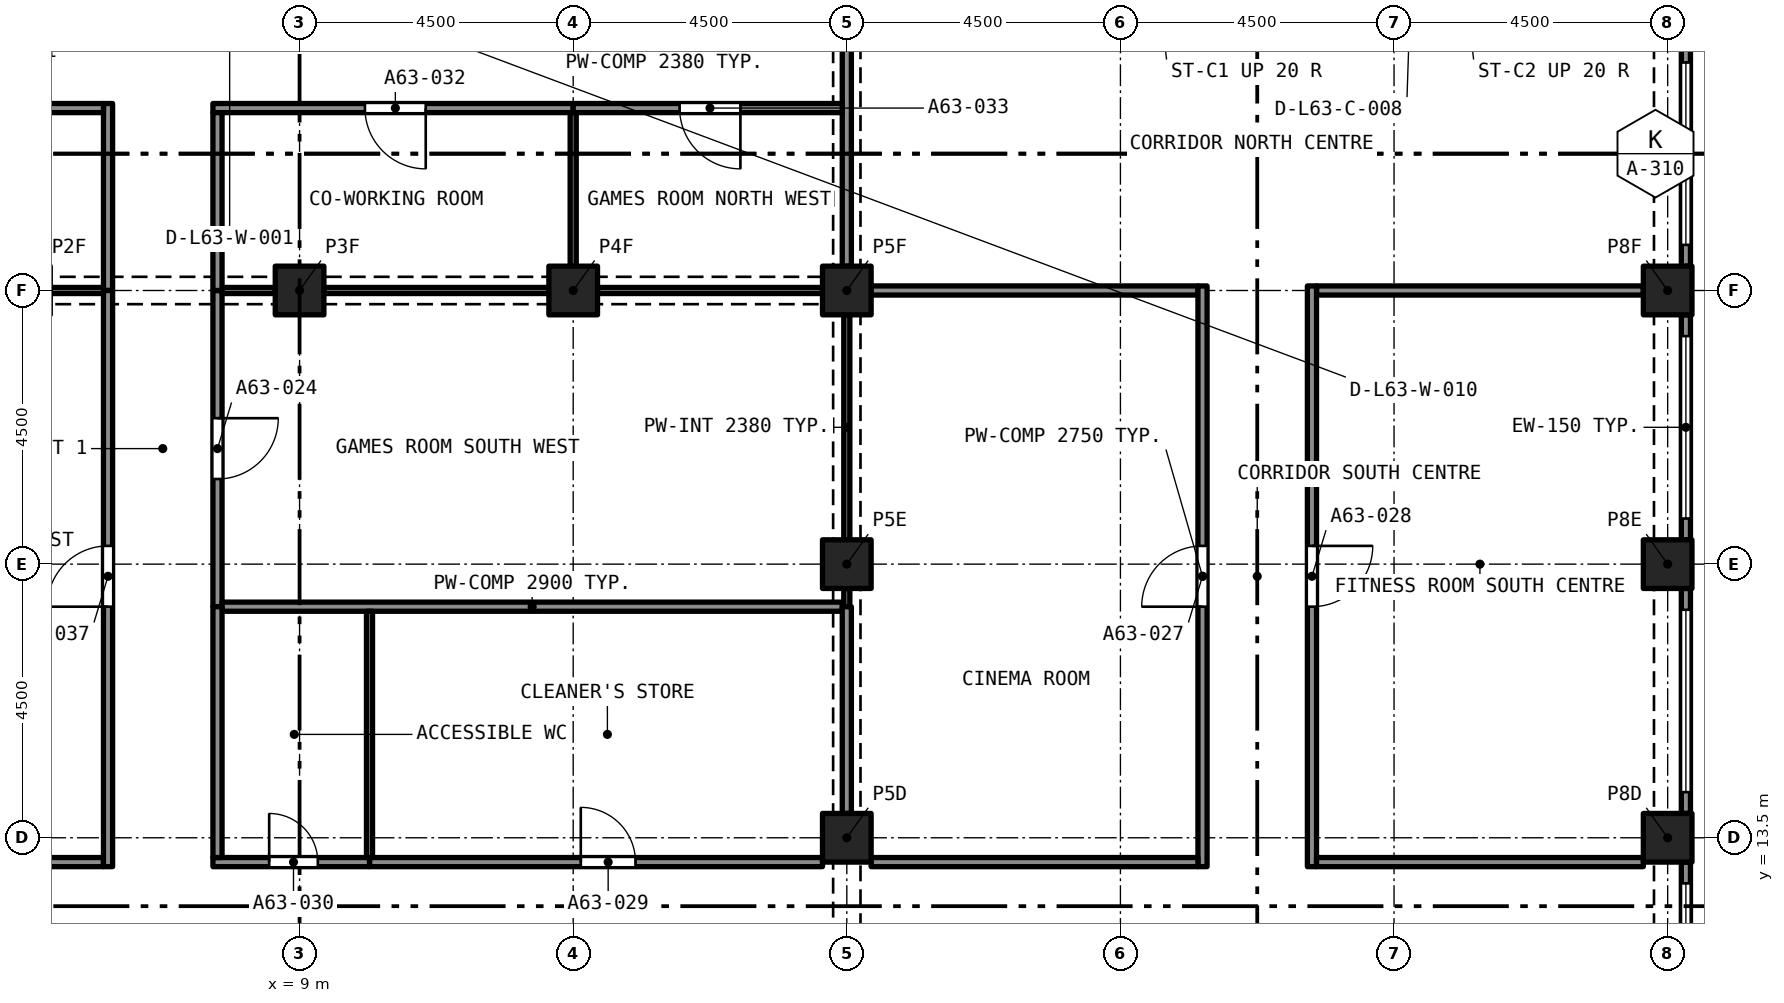
"""IFC4 building model, lengths in metres.
Left out: names, types, materials, properties, quantities, classifications, styles, units other than length and angle.
Written with IfcOpenShell. Run it as: python <this file> out.ifc"""

import sys

from ifc_helpers import new_model, si_unit, direction, frame, frame_2d, origin, origin_2d, place, context, subcontext, project, spatial, rectangle, extrude, element, fill, save


model = new_model("IFC4")
c1 = context("Model", 3, precision=1e-05, world=origin(), true_north=direction((0.0, 1.0)))
c2 = subcontext(c1, "Body", "Model", "MODEL_VIEW")
j1 = project(units=[si_unit("LENGTHUNIT", "METRE"), si_unit("PLANEANGLEUNIT", "RADIAN")], contexts=[c1])
p1 = place(None, origin())
s1 = spatial("IfcSite", under=j1, at=p1, CompositionType="ELEMENT")
p2 = place(p1, origin())
s2 = spatial("IfcBuilding", under=s1, at=p2, CompositionType="ELEMENT")
p3 = place(p2, frame((0.0, 0.0, 226.095)))
s3 = spatial("IfcBuildingStorey", under=s2, at=p3, CompositionType="ELEMENT", Elevation=226.095)
for number, where, z_axis, x_axis in (
    (1, (18.0, 13.5, 0.0), (0.0, 0.0, 1.0), (1.0, 0.0, 0.0)),
    (2, (31.5, 13.5, 0.0), (0.0, 0.0, 1.0), (1.0, 0.0, 0.0)),
    (3, (18.0, 18.0, 0.0), (0.0, 0.0, 1.0), (1.0, 0.0, 0.0)),
    (4, (31.5, 18.0, 0.0), (0.0, 0.0, 1.0), (1.0, 0.0, 0.0)),
    (5, (9.0, 22.5, 0.0), (0.0, 0.0, 1.0), (1.0, 0.0, 0.0)),
    (6, (13.5, 22.5, 0.0), (0.0, 0.0, 1.0), (1.0, 0.0, 0.0)),
    (7, (18.0, 22.5, 0.0), (0.0, 0.0, 1.0), (1.0, 0.0, 0.0)),
    (8, (31.5, 22.5, 0.0), (0.0, 0.0, 1.0), (1.0, 0.0, 0.0)),
):
    element("IfcColumn", number, at=place(p3, frame(where, z_axis=z_axis, x_axis=x_axis)), inside=s3, PredefinedType="COLUMN", context=c2, shape_type="SweptSolid", body=[
        extrude(rectangle(XDim=0.8, YDim=0.8, at=origin_2d()), origin(), (0.0, 0.0, 1.0), 3.2),
    ])
p4 = place(p3, frame((31.8, 13.1, 0.0), z_axis=(0.0, 0.0, 1.0), x_axis=(0.0, -1.0, 0.0)))
e9 = element("IfcWall", 9, at=p4, inside=s3, PredefinedType="SOLIDWALL", context=c2, shape_type="SweptSolid", body=[
    extrude(rectangle(XDim=3.7, YDim=0.15, at=frame_2d((1.85, 0.0))), origin(), (0.0, 0.0, 1.0), 3.2),
])
p5 = place(p4, frame((0.35, 0.0, 0.45)))
e10 = element("IfcOpeningElement", 10, at=p5, cuts=e9, PredefinedType="OPENING", context=c2, shape_type="SweptSolid", body=[
    extrude(rectangle(XDim=3.0, YDim=1.95, at=frame_2d((1.5, 0.975))), frame((0.0, 0.085, 0.0), z_axis=(0.0, -1.0, 0.0), x_axis=(1.0, 0.0, 0.0)), (0.0, 0.0, 1.0), 0.17),
])
p6 = place(p3, frame((31.8, 17.6, 0.0), z_axis=(0.0, 0.0, 1.0), x_axis=(0.0, -1.0, 0.0)))
e11 = element("IfcWall", 11, at=p6, inside=s3, PredefinedType="SOLIDWALL", context=c2, shape_type="SweptSolid", body=[
    extrude(rectangle(XDim=3.7, YDim=0.15, at=frame_2d((1.85, 0.0))), origin(), (0.0, 0.0, 1.0), 3.2),
])
p7 = place(p6, frame((0.35, 0.0, 0.45)))
e12 = element("IfcOpeningElement", 12, at=p7, cuts=e11, PredefinedType="OPENING", context=c2, shape_type="SweptSolid", body=[
    extrude(rectangle(XDim=3.0, YDim=1.95, at=frame_2d((1.5, 0.975))), frame((0.0, 0.085, 0.0), z_axis=(0.0, -1.0, 0.0), x_axis=(1.0, 0.0, 0.0)), (0.0, 0.0, 1.0), 0.17),
])
p8 = place(p3, frame((31.8, 22.1, 0.0), z_axis=(0.0, 0.0, 1.0), x_axis=(0.0, -1.0, 0.0)))
e13 = element("IfcWall", 13, at=p8, inside=s3, PredefinedType="SOLIDWALL", context=c2, shape_type="SweptSolid", body=[
    extrude(rectangle(XDim=3.7, YDim=0.15, at=frame_2d((1.85, 0.0))), origin(), (0.0, 0.0, 1.0), 3.2),
])
p9 = place(p8, frame((0.35, 0.0, 0.45)))
e14 = element("IfcOpeningElement", 14, at=p9, cuts=e13, PredefinedType="OPENING", context=c2, shape_type="SweptSolid", body=[
    extrude(rectangle(XDim=3.0, YDim=1.95, at=frame_2d((1.5, 0.975))), frame((0.0, 0.085, 0.0), z_axis=(0.0, -1.0, 0.0), x_axis=(1.0, 0.0, 0.0)), (0.0, 0.0, 1.0), 0.17),
])
p10 = place(p3, frame((31.8, 26.6, 0.0), z_axis=(0.0, 0.0, 1.0), x_axis=(0.0, -1.0, 0.0)))
e15 = element("IfcWall", 15, at=p10, inside=s3, PredefinedType="SOLIDWALL", context=c2, shape_type="SweptSolid", body=[
    extrude(rectangle(XDim=3.7, YDim=0.15, at=frame_2d((1.85, 0.0))), origin(), (0.0, 0.0, 1.0), 3.2),
])
p11 = place(p10, frame((0.35, 0.0, 0.45)))
e16 = element("IfcOpeningElement", 16, at=p11, cuts=e15, PredefinedType="OPENING", context=c2, shape_type="SweptSolid", body=[
    extrude(rectangle(XDim=3.0, YDim=1.95, at=frame_2d((1.5, 0.975))), frame((0.0, 0.085, 0.0), z_axis=(0.0, -1.0, 0.0), x_axis=(1.0, 0.0, 0.0)), (0.0, 0.0, 1.0), 0.17),
])
p12 = place(p3, frame((18.0, 18.4, 0.0), z_axis=(0.0, 0.0, 1.0), x_axis=(0.0, 1.0, 0.0)))
e17 = element("IfcWall", 17, at=p12, inside=s3, PredefinedType="PARTITIONING", context=c2, shape_type="SweptSolid", body=[
    extrude(rectangle(XDim=3.7, YDim=0.1, at=frame_2d((1.85, 0.0))), origin(), (0.0, 0.0, 1.0), 2.38),
])
p13 = place(p3, frame((18.0, 17.3, 0.0), z_axis=(0.0, 0.0, 1.0), x_axis=(0.0, 1.0, 0.0)))
e18 = element("IfcWall", 18, at=p13, inside=s3, PredefinedType="PARTITIONING", context=c2, shape_type="SweptSolid", body=[
    extrude(rectangle(XDim=0.3, YDim=0.1, at=frame_2d((0.15, 0.0))), origin(), (0.0, 0.0, 1.0), 2.75),
])
p14 = place(p3, frame((7.65, 22.5, 0.0), z_axis=(0.0, 0.0, 1.0), x_axis=(0.0, -1.0, 0.0)))
e19 = element("IfcWall", 19, at=p14, inside=s3, PredefinedType="PARTITIONING", context=c2, shape_type="SweptSolid", body=[
    extrude(rectangle(XDim=5.2, YDim=0.15, at=frame_2d((2.6, 0.0))), origin(), (0.0, 0.0, 1.0), 2.9),
])
p15 = place(p14, frame((2.1, 0.0, 0.0)))
e20 = element("IfcOpeningElement", 20, at=p15, cuts=e19, PredefinedType="OPENING", context=c2, shape_type="SweptSolid", body=[
    extrude(rectangle(XDim=1.0, YDim=2.1, at=frame_2d((0.5, 1.05))), frame((0.0, 0.085, 0.0), z_axis=(0.0, -1.0, 0.0), x_axis=(1.0, 0.0, 0.0)), (0.0, 0.0, 1.0), 0.17),
])
p16 = place(p3, frame((7.725, 22.5, 0.0), z_axis=(0.0, 0.0, 1.0), x_axis=(1.0, 0.0, 0.0)))
e21 = element("IfcWall", 21, at=p16, inside=s3, PredefinedType="PARTITIONING", context=c2, shape_type="SweptSolid", body=[
    extrude(rectangle(XDim=0.875, YDim=0.1, at=frame_2d((0.438, 0.0))), origin(), (0.0, 0.0, 1.0), 2.38),
])
for number, where, z_axis, x_axis in (
    (22, (9.4, 22.5, 0.0), (0.0, 0.0, 1.0), (1.0, 0.0, 0.0)),
    (23, (13.9, 22.5, 0.0), (0.0, 0.0, 1.0), (1.0, 0.0, 0.0)),
):
    element("IfcWall", number, at=place(p3, frame(where, z_axis=z_axis, x_axis=x_axis)), inside=s3, PredefinedType="PARTITIONING", context=c2, shape_type="SweptSolid", body=[
        extrude(rectangle(XDim=3.7, YDim=0.1, at=frame_2d((1.85, 0.0))), origin(), (0.0, 0.0, 1.0), 2.38),
    ])
p17 = place(p3, frame((7.725, 17.3, 0.0), z_axis=(0.0, 0.0, 1.0), x_axis=(1.0, 0.0, 0.0)))
e24 = element("IfcWall", 24, at=p17, inside=s3, PredefinedType="PARTITIONING", context=c2, shape_type="SweptSolid", body=[
    extrude(rectangle(XDim=10.2, YDim=0.15, at=frame_2d((5.1, 0.0))), origin(), (0.0, 0.0, 1.0), 2.9),
])
for number, where, z_axis, x_axis in (
    (25, (18.4, 22.5, 0.0), (0.0, 0.0, 1.0), (1.0, 0.0, 0.0)),
    (26, (25.725, 22.5, 0.0), (0.0, 0.0, 1.0), (1.0, 0.0, 0.0)),
):
    element("IfcWall", number, at=place(p3, frame(where, z_axis=z_axis, x_axis=x_axis)), inside=s3, PredefinedType="PARTITIONING", context=c2, shape_type="SweptSolid", body=[
        extrude(rectangle(XDim=5.375, YDim=0.15, at=frame_2d((2.688, 0.0))), origin(), (0.0, 0.0, 1.0), 2.75),
    ])
p18 = place(p3, frame((18.0, 22.9, 0.0), z_axis=(0.0, 0.0, 1.0), x_axis=(0.0, 1.0, 0.0)))
e27 = element("IfcWall", 27, at=p18, inside=s3, PredefinedType="PARTITIONING", context=c2, shape_type="SweptSolid", body=[
    extrude(rectangle(XDim=3.7, YDim=0.15, at=frame_2d((1.85, 0.0))), origin(), (0.0, 0.0, 1.0), 2.38),
])
p19 = place(p3, frame((23.85, 13.025, 0.0), z_axis=(0.0, 0.0, 1.0), x_axis=(0.0, 1.0, 0.0)))
e28 = element("IfcWall", 28, at=p19, inside=s3, PredefinedType="PARTITIONING", context=c2, shape_type="SweptSolid", body=[
    extrude(rectangle(XDim=9.55, YDim=0.15, at=frame_2d((4.775, 0.0))), origin(), (0.0, 0.0, 1.0), 2.75),
])
p20 = place(p19, frame((4.275, 0.0, 0.0)))
e29 = element("IfcOpeningElement", 29, at=p20, cuts=e28, PredefinedType="OPENING", context=c2, shape_type="SweptSolid", body=[
    extrude(rectangle(XDim=1.0, YDim=2.1, at=frame_2d((0.5, 1.05))), frame((0.0, 0.085, 0.0), z_axis=(0.0, -1.0, 0.0), x_axis=(1.0, 0.0, 0.0)), (0.0, 0.0, 1.0), 0.17),
])
p21 = place(p3, frame((25.65, 22.575, 0.0), z_axis=(0.0, 0.0, 1.0), x_axis=(0.0, -1.0, 0.0)))
e30 = element("IfcWall", 30, at=p21, inside=s3, PredefinedType="PARTITIONING", context=c2, shape_type="SweptSolid", body=[
    extrude(rectangle(XDim=9.55, YDim=0.15, at=frame_2d((4.775, 0.0))), origin(), (0.0, 0.0, 1.0), 2.75),
])
p22 = place(p21, frame((4.275, 0.0, 0.0)))
e31 = element("IfcOpeningElement", 31, at=p22, cuts=e30, PredefinedType="OPENING", context=c2, shape_type="SweptSolid", body=[
    extrude(rectangle(XDim=1.0, YDim=2.1, at=frame_2d((0.5, 1.05))), frame((0.0, 0.085, 0.0), z_axis=(0.0, -1.0, 0.0), x_axis=(1.0, 0.0, 0.0)), (0.0, 0.0, 1.0), 0.17),
])
for number, where, z_axis, x_axis in (
    (32, (18.4, 13.1, 0.0), (0.0, 0.0, 1.0), (1.0, 0.0, 0.0)),
    (33, (25.725, 13.1, 0.0), (0.0, 0.0, 1.0), (1.0, 0.0, 0.0)),
):
    element("IfcWall", number, at=place(p3, frame(where, z_axis=z_axis, x_axis=x_axis)), inside=s3, PredefinedType="PARTITIONING", context=c2, shape_type="SweptSolid", body=[
        extrude(rectangle(XDim=5.375, YDim=0.15, at=frame_2d((2.688, 0.0))), origin(), (0.0, 0.0, 1.0), 2.75),
    ])
p23 = place(p3, frame((10.15, 13.1, 0.0), z_axis=(0.0, 0.0, 1.0), x_axis=(1.0, 0.0, 0.0)))
e34 = element("IfcWall", 34, at=p23, inside=s3, PredefinedType="PARTITIONING", context=c2, shape_type="SweptSolid", body=[
    extrude(rectangle(XDim=7.45, YDim=0.15, at=frame_2d((3.725, 0.0))), origin(), (0.0, 0.0, 1.0), 2.9),
])
p24 = place(p23, frame((3.475, 0.0, 0.0)))
e35 = element("IfcOpeningElement", 35, at=p24, cuts=e34, PredefinedType="OPENING", context=c2, shape_type="SweptSolid", body=[
    extrude(rectangle(XDim=0.9, YDim=2.1, at=frame_2d((0.45, 1.05))), frame((0.0, 0.085, 0.0), z_axis=(0.0, -1.0, 0.0), x_axis=(1.0, 0.0, 0.0)), (0.0, 0.0, 1.0), 0.17),
])
p25 = place(p3, frame((7.575, 13.1, 0.0), z_axis=(0.0, 0.0, 1.0), x_axis=(1.0, 0.0, 0.0)))
e36 = element("IfcWall", 36, at=p25, inside=s3, PredefinedType="PARTITIONING", context=c2, shape_type="SweptSolid", body=[
    extrude(rectangle(XDim=2.575, YDim=0.15, at=frame_2d((1.288, 0.0))), origin(), (0.0, 0.0, 1.0), 2.9),
])
p26 = place(p25, frame((0.925, 0.0, 0.0)))
e37 = element("IfcOpeningElement", 37, at=p26, cuts=e36, PredefinedType="OPENING", context=c2, shape_type="SweptSolid", body=[
    extrude(rectangle(XDim=0.8, YDim=2.1, at=frame_2d((0.4, 1.05))), frame((0.0, 0.085, 0.0), z_axis=(0.0, -1.0, 0.0), x_axis=(1.0, 0.0, 0.0)), (0.0, 0.0, 1.0), 0.17),
])
p27 = place(p3, frame((0.4, 13.1, 0.0), z_axis=(0.0, 0.0, 1.0), x_axis=(1.0, 0.0, 0.0)))
e38 = element("IfcWall", 38, at=p27, inside=s3, PredefinedType="PARTITIONING", context=c2, shape_type="SweptSolid", body=[
    extrude(rectangle(XDim=5.375, YDim=0.15, at=frame_2d((2.688, 0.0))), origin(), (0.0, 0.0, 1.0), 2.9),
])
p28 = place(p3, frame((18.0, 13.9, 0.0), z_axis=(0.0, 0.0, 1.0), x_axis=(0.0, 1.0, 0.0)))
e39 = element("IfcWall", 39, at=p28, inside=s3, PredefinedType="PARTITIONING", context=c2, shape_type="SweptSolid", body=[
    extrude(rectangle(XDim=3.4, YDim=0.15, at=frame_2d((1.7, 0.0))), origin(), (0.0, 0.0, 1.0), 2.38),
])
p29 = place(p3, frame((5.85, 22.5, 0.0), z_axis=(0.0, 0.0, 1.0), x_axis=(0.0, 1.0, 0.0)))
e40 = element("IfcWall", 40, at=p29, inside=s3, PredefinedType="PARTITIONING", context=c2, shape_type="SweptSolid", body=[
    extrude(rectangle(XDim=3.075, YDim=0.15, at=frame_2d((1.538, 0.0))), origin(), (0.0, 0.0, 1.0), 2.9),
])
p30 = place(p3, frame((3.425, 25.5, 0.0), z_axis=(0.0, 0.0, 1.0), x_axis=(1.0, 0.0, 0.0)))
e41 = element("IfcWall", 41, at=p30, inside=s3, PredefinedType="PARTITIONING", context=c2, shape_type="SweptSolid", body=[
    extrude(rectangle(XDim=2.35, YDim=0.15, at=frame_2d((1.175, 0.0))), origin(), (0.0, 0.0, 1.0), 2.9),
])
p31 = place(p3, frame((13.5, 25.5, 0.0), z_axis=(0.0, 0.0, 1.0), x_axis=(-1.0, 0.0, 0.0)))
e42 = element("IfcWall", 42, at=p31, inside=s3, PredefinedType="PARTITIONING", context=c2, shape_type="SweptSolid", body=[
    extrude(rectangle(XDim=5.925, YDim=0.15, at=frame_2d((2.962, 0.0))), origin(), (0.0, 0.0, 1.0), 2.9),
])
p32 = place(p31, frame((2.425, 0.0, 0.0)))
e43 = element("IfcOpeningElement", 43, at=p32, cuts=e42, PredefinedType="OPENING", context=c2, shape_type="SweptSolid", body=[
    extrude(rectangle(XDim=1.0, YDim=2.1, at=frame_2d((0.5, 1.05))), frame((0.0, 0.085, 0.0), z_axis=(0.0, -1.0, 0.0), x_axis=(1.0, 0.0, 0.0)), (0.0, 0.0, 1.0), 0.17),
])
p33 = place(p3, frame((7.65, 22.5, 0.0), z_axis=(0.0, 0.0, 1.0), x_axis=(0.0, 1.0, 0.0)))
e44 = element("IfcWall", 44, at=p33, inside=s3, PredefinedType="PARTITIONING", context=c2, shape_type="SweptSolid", body=[
    extrude(rectangle(XDim=2.925, YDim=0.15, at=frame_2d((1.462, 0.0))), origin(), (0.0, 0.0, 1.0), 2.9),
])
p34 = place(p3, frame((17.925, 25.5, 0.0), z_axis=(0.0, 0.0, 1.0), x_axis=(-1.0, 0.0, 0.0)))
e45 = element("IfcWall", 45, at=p34, inside=s3, PredefinedType="PARTITIONING", context=c2, shape_type="SweptSolid", body=[
    extrude(rectangle(XDim=4.425, YDim=0.15, at=frame_2d((2.212, 0.0))), origin(), (0.0, 0.0, 1.0), 2.9),
])
p35 = place(p34, frame((1.675, 0.0, 0.0)))
e46 = element("IfcOpeningElement", 46, at=p35, cuts=e45, PredefinedType="OPENING", context=c2, shape_type="SweptSolid", body=[
    extrude(rectangle(XDim=1.0, YDim=2.1, at=frame_2d((0.5, 1.05))), frame((0.0, 0.085, 0.0), z_axis=(0.0, -1.0, 0.0), x_axis=(1.0, 0.0, 0.0)), (0.0, 0.0, 1.0), 0.17),
])
p36 = place(p3, frame((7.65, 13.175, 0.0), z_axis=(0.0, 0.0, 1.0), x_axis=(0.0, 1.0, 0.0)))
e47 = element("IfcWall", 47, at=p36, inside=s3, PredefinedType="PARTITIONING", context=c2, shape_type="SweptSolid", body=[
    extrude(rectangle(XDim=4.125, YDim=0.15, at=frame_2d((2.062, 0.0))), origin(), (0.0, 0.0, 1.0), 2.9),
])
p37 = place(p3, frame((5.85, 13.025, 0.0), z_axis=(0.0, 0.0, 1.0), x_axis=(0.0, 1.0, 0.0)))
e48 = element("IfcWall", 48, at=p37, inside=s3, PredefinedType="PARTITIONING", context=c2, shape_type="SweptSolid", body=[
    extrude(rectangle(XDim=9.475, YDim=0.15, at=frame_2d((4.738, 0.0))), origin(), (0.0, 0.0, 1.0), 2.9),
])
p38 = place(p37, frame((4.275, 0.0, 0.0)))
e49 = element("IfcOpeningElement", 49, at=p38, cuts=e48, PredefinedType="OPENING", context=c2, shape_type="SweptSolid", body=[
    extrude(rectangle(XDim=1.0, YDim=2.1, at=frame_2d((0.5, 1.05))), frame((0.0, 0.085, 0.0), z_axis=(0.0, -1.0, 0.0), x_axis=(1.0, 0.0, 0.0)), (0.0, 0.0, 1.0), 0.17),
])
p39 = place(p3, frame((4.9, 22.5, 0.0), z_axis=(0.0, 0.0, 1.0), x_axis=(1.0, 0.0, 0.0)))
e50 = element("IfcWall", 50, at=p39, inside=s3, PredefinedType="PARTITIONING", context=c2, shape_type="SweptSolid", body=[
    extrude(rectangle(XDim=0.875, YDim=0.1, at=frame_2d((0.438, 0.0))), origin(), (0.0, 0.0, 1.0), 2.38),
])
p40 = place(p3, frame((13.5, 22.9, 0.0), z_axis=(0.0, 0.0, 1.0), x_axis=(0.0, 1.0, 0.0)))
e51 = element("IfcWall", 51, at=p40, inside=s3, PredefinedType="PARTITIONING", context=c2, shape_type="SweptSolid", body=[
    extrude(rectangle(XDim=2.525, YDim=0.1, at=frame_2d((1.263, 0.0))), origin(), (0.0, 0.0, 1.0), 2.9),
])
p41 = place(p3, frame((10.15, 13.175, 0.0), z_axis=(0.0, 0.0, 1.0), x_axis=(0.0, 1.0, 0.0)))
e52 = element("IfcWall", 52, at=p41, inside=s3, PredefinedType="PARTITIONING", context=c2, shape_type="SweptSolid", body=[
    extrude(rectangle(XDim=4.05, YDim=0.1, at=frame_2d((2.025, 0.0))), origin(), (0.0, 0.0, 1.0), 2.9),
])
p42 = place(p5, origin())
e53 = element("IfcWindow", 53, at=p42, inside=s3, PartitioningType="SINGLE_PANEL", PredefinedType="WINDOW", context=c2, shape_type="SweptSolid", body=[
    extrude(rectangle(XDim=3.0, YDim=1.95, at=frame_2d((1.5, 0.975))), frame((0.0, 0.03, 0.0), z_axis=(0.0, -1.0, 0.0), x_axis=(1.0, 0.0, 0.0)), (0.0, 0.0, 1.0), 0.06),
])
fill(e10, e53)
p43 = place(p7, origin())
e54 = element("IfcWindow", 54, at=p43, inside=s3, PartitioningType="SINGLE_PANEL", PredefinedType="WINDOW", context=c2, shape_type="SweptSolid", body=[
    extrude(rectangle(XDim=3.0, YDim=1.95, at=frame_2d((1.5, 0.975))), frame((0.0, 0.03, 0.0), z_axis=(0.0, -1.0, 0.0), x_axis=(1.0, 0.0, 0.0)), (0.0, 0.0, 1.0), 0.06),
])
fill(e12, e54)
p44 = place(p9, origin())
e55 = element("IfcWindow", 55, at=p44, inside=s3, PartitioningType="SINGLE_PANEL", PredefinedType="WINDOW", context=c2, shape_type="SweptSolid", body=[
    extrude(rectangle(XDim=3.0, YDim=1.95, at=frame_2d((1.5, 0.975))), frame((0.0, 0.03, 0.0), z_axis=(0.0, -1.0, 0.0), x_axis=(1.0, 0.0, 0.0)), (0.0, 0.0, 1.0), 0.06),
])
fill(e14, e55)
p45 = place(p11, origin())
e56 = element("IfcWindow", 56, at=p45, inside=s3, PartitioningType="SINGLE_PANEL", PredefinedType="WINDOW", context=c2, shape_type="SweptSolid", body=[
    extrude(rectangle(XDim=3.0, YDim=1.95, at=frame_2d((1.5, 0.975))), frame((0.0, 0.03, 0.0), z_axis=(0.0, -1.0, 0.0), x_axis=(1.0, 0.0, 0.0)), (0.0, 0.0, 1.0), 0.06),
])
fill(e16, e56)
p46 = place(p15, origin())
e57 = element("IfcDoor", 57, at=p46, inside=s3, OperationType="SINGLE_SWING_RIGHT", PredefinedType="DOOR", context=c2, shape_type="SweptSolid", body=[
    extrude(rectangle(XDim=1.0, YDim=2.1, at=frame_2d((0.5, 1.05))), frame((0.0, 0.025, 0.0), z_axis=(0.0, -1.0, 0.0), x_axis=(1.0, 0.0, 0.0)), (0.0, 0.0, 1.0), 0.05),
])
fill(e20, e57)
p47 = place(p20, origin())
e58 = element("IfcDoor", 58, at=p47, inside=s3, OperationType="SINGLE_SWING_RIGHT", PredefinedType="DOOR", context=c2, shape_type="SweptSolid", body=[
    extrude(rectangle(XDim=1.0, YDim=2.1, at=frame_2d((0.5, 1.05))), frame((0.0, 0.025, 0.0), z_axis=(0.0, -1.0, 0.0), x_axis=(1.0, 0.0, 0.0)), (0.0, 0.0, 1.0), 0.05),
])
fill(e29, e58)
p48 = place(p22, origin())
e59 = element("IfcDoor", 59, at=p48, inside=s3, OperationType="SINGLE_SWING_LEFT", PredefinedType="DOOR", context=c2, shape_type="SweptSolid", body=[
    extrude(rectangle(XDim=1.0, YDim=2.1, at=frame_2d((0.5, 1.05))), frame((0.0, 0.025, 0.0), z_axis=(0.0, -1.0, 0.0), x_axis=(1.0, 0.0, 0.0)), (0.0, 0.0, 1.0), 0.05),
])
fill(e31, e59)
p49 = place(p24, origin())
e60 = element("IfcDoor", 60, at=p49, inside=s3, OperationType="SINGLE_SWING_RIGHT", PredefinedType="DOOR", context=c2, shape_type="SweptSolid", body=[
    extrude(rectangle(XDim=0.9, YDim=2.1, at=frame_2d((0.45, 1.05))), frame((0.0, 0.025, 0.0), z_axis=(0.0, -1.0, 0.0), x_axis=(1.0, 0.0, 0.0)), (0.0, 0.0, 1.0), 0.05),
])
fill(e35, e60)
p50 = place(p26, origin())
e61 = element("IfcDoor", 61, at=p50, inside=s3, OperationType="SINGLE_SWING_RIGHT", PredefinedType="DOOR", context=c2, shape_type="SweptSolid", body=[
    extrude(rectangle(XDim=0.8, YDim=2.1, at=frame_2d((0.4, 1.05))), frame((0.0, 0.025, 0.0), z_axis=(0.0, -1.0, 0.0), x_axis=(1.0, 0.0, 0.0)), (0.0, 0.0, 1.0), 0.05),
])
fill(e37, e61)
p51 = place(p32, origin())
e62 = element("IfcDoor", 62, at=p51, inside=s3, OperationType="SINGLE_SWING_LEFT", PredefinedType="DOOR", context=c2, shape_type="SweptSolid", body=[
    extrude(rectangle(XDim=1.0, YDim=2.1, at=frame_2d((0.5, 1.05))), frame((0.0, 0.025, 0.0), z_axis=(0.0, -1.0, 0.0), x_axis=(1.0, 0.0, 0.0)), (0.0, 0.0, 1.0), 0.05),
])
fill(e43, e62)
p52 = place(p35, origin())
e63 = element("IfcDoor", 63, at=p52, inside=s3, OperationType="SINGLE_SWING_LEFT", PredefinedType="DOOR", context=c2, shape_type="SweptSolid", body=[
    extrude(rectangle(XDim=1.0, YDim=2.1, at=frame_2d((0.5, 1.05))), frame((0.0, 0.025, 0.0), z_axis=(0.0, -1.0, 0.0), x_axis=(1.0, 0.0, 0.0)), (0.0, 0.0, 1.0), 0.05),
])
fill(e46, e63)
p53 = place(p38, origin())
e64 = element("IfcDoor", 64, at=p53, inside=s3, OperationType="SINGLE_SWING_RIGHT", PredefinedType="DOOR", context=c2, shape_type="SweptSolid", body=[
    extrude(rectangle(XDim=1.0, YDim=2.1, at=frame_2d((0.5, 1.05))), frame((0.0, 0.025, 0.0), z_axis=(0.0, -1.0, 0.0), x_axis=(1.0, 0.0, 0.0)), (0.0, 0.0, 1.0), 0.05),
])
fill(e49, e64)
save(model, sys.argv[1])
